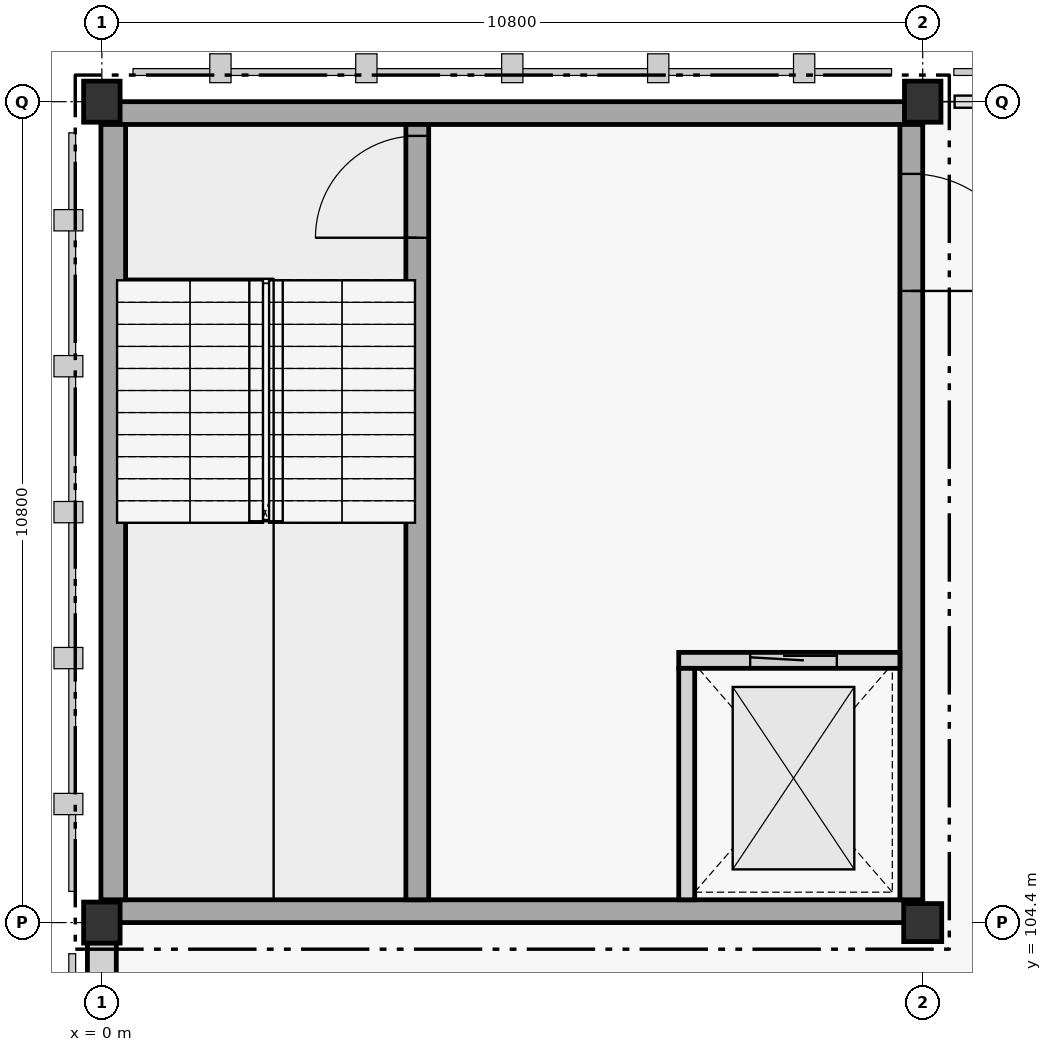
"""IFC4 building model, lengths in metres.
Left out: names, types, materials, properties, quantities, classifications, styles, units other than length and angle.
Written with IfcOpenShell. Run it as: python <this file> out.ifc"""

import sys

from ifc_helpers import new_model, si_unit, direction, frame, frame_2d, origin, origin_2d, place, context, subcontext, project, spatial, rectangle, extrude, element, fill, save


model = new_model("IFC4")
c1 = context("Model", 3, precision=1e-05, world=origin(), true_north=direction((0.0, 1.0)))
c2 = subcontext(c1, "Body", "Model", "MODEL_VIEW")
j1 = project(units=[si_unit("LENGTHUNIT", "METRE"), si_unit("PLANEANGLEUNIT", "RADIAN")], contexts=[c1])
p1 = place(None, origin())
s1 = spatial("IfcSite", under=j1, at=p1, CompositionType="ELEMENT")
p2 = place(p1, origin())
s2 = spatial("IfcBuilding", under=s1, at=p2, CompositionType="ELEMENT")
p3 = place(p2, frame((0.0, 0.0, 15.0)))
s3 = spatial("IfcBuildingStorey", under=s2, at=p3, CompositionType="ELEMENT", Elevation=15.0)
for number, where, z_axis, x_axis in (
    (1, (0.0, 104.4, 0.0), (0.0, 0.0, 1.0), (1.0, 0.0, 0.0)),
    (2, (0.0, 115.2, 0.0), (0.0, 0.0, 1.0), (1.0, 0.0, 0.0)),
):
    element("IfcColumn", number, at=place(p3, frame(where, z_axis=z_axis, x_axis=x_axis)), inside=s3, PredefinedType="COLUMN", context=c2, shape_type="SweptSolid", body=[
        extrude(rectangle(XDim=0.48, YDim=0.54, at=origin_2d()), origin(), (0.0, 0.0, 1.0), 4.2),
    ])
p4 = place(p3, frame((10.8, 104.4, 0.0), z_axis=(0.0, 0.0, 1.0), x_axis=(1.0, 0.0, 0.0)))
e3 = element("IfcColumn", 3, at=p4, inside=s3, PredefinedType="COLUMN", context=c2, shape_type="SweptSolid", body=[
    extrude(rectangle(XDim=0.5, YDim=0.5, at=origin_2d()), origin(), (0.0, 0.0, 1.0), 4.2),
])
p5 = place(p3, frame((10.8, 115.2, 0.0), z_axis=(0.0, 0.0, 1.0), x_axis=(1.0, 0.0, 0.0)))
e4 = element("IfcColumn", 4, at=p5, inside=s3, PredefinedType="COLUMN", context=c2, shape_type="SweptSolid", body=[
    extrude(rectangle(XDim=0.48, YDim=0.54, at=origin_2d()), origin(), (0.0, 0.0, 1.0), 4.2),
])
for number, where, z_axis, x_axis in (
    (5, (10.8, 104.55, 0.0), (0.0, 0.0, 1.0), (-1.0, 0.0, 0.0)),
    (6, (0.0, 115.05, 0.0), (0.0, 0.0, 1.0), (1.0, 0.0, 0.0)),
):
    element("IfcWall", number, at=place(p3, frame(where, z_axis=z_axis, x_axis=x_axis)), inside=s3, PredefinedType="SHEAR", context=c2, shape_type="SweptSolid", body=[
        extrude(rectangle(XDim=10.8, YDim=0.3, at=frame_2d((5.4, 0.0))), origin(), (0.0, 0.0, 1.0), 4.2),
    ])
p6 = place(p3, frame((0.15, 104.7, 0.0), z_axis=(0.0, 0.0, 1.0), x_axis=(0.0, 1.0, 0.0)))
e7 = element("IfcWall", 7, at=p6, inside=s3, PredefinedType="SHEAR", context=c2, shape_type="SweptSolid", body=[
    extrude(rectangle(XDim=10.2, YDim=0.325, at=frame_2d((5.1, 0.0))), origin(), (0.0, 0.0, 1.0), 4.2),
])
p7 = place(p3, frame((10.65, 114.9, 0.0), z_axis=(0.0, 0.0, 1.0), x_axis=(0.0, -1.0, 0.0)))
e8 = element("IfcWall", 8, at=p7, inside=s3, PredefinedType="SHEAR", context=c2, shape_type="SweptSolid", body=[
    extrude(rectangle(XDim=10.2, YDim=0.3, at=frame_2d((5.1, 0.0))), origin(), (0.0, 0.0, 1.0), 4.2),
])
p8 = place(p7, frame((0.65, 0.0, 0.0)))
e9 = element("IfcOpeningElement", 9, at=p8, cuts=e8, PredefinedType="OPENING", context=c2, shape_type="SweptSolid", body=[
    extrude(rectangle(XDim=1.54, YDim=2.22, at=frame_2d((0.77, 1.11))), frame((0.0, 0.15, 0.0), z_axis=(0.0, -1.0, 0.0), x_axis=(1.0, 0.0, 0.0)), (0.0, 0.0, 1.0), 0.3),
])
p9 = place(p3, frame((4.15, 104.7, 0.0), z_axis=(0.0, 0.0, 1.0), x_axis=(0.0, 1.0, 0.0)))
e10 = element("IfcWall", 10, at=p9, inside=s3, PredefinedType="SHEAR", context=c2, shape_type="SweptSolid", body=[
    extrude(rectangle(XDim=10.2, YDim=0.3, at=frame_2d((5.1, 0.0))), origin(), (0.0, 0.0, 1.0), 4.2),
])
p10 = place(p9, frame((8.71, 0.0, 0.0)))
e11 = element("IfcOpeningElement", 11, at=p10, cuts=e10, PredefinedType="OPENING", context=c2, shape_type="SweptSolid", body=[
    extrude(rectangle(XDim=1.34, YDim=2.18, at=frame_2d((0.67, 1.09))), frame((0.0, 0.15, 0.0), z_axis=(0.0, -1.0, 0.0), x_axis=(1.0, 0.0, 0.0)), (0.0, 0.0, 1.0), 0.3),
])
p11 = place(p3, frame((0.0, 97.466, 0.0), z_axis=(0.0, 0.0, 1.0), x_axis=(0.0, 1.0, 0.0)))
e12 = element("IfcWall", 12, at=p11, inside=s3, PredefinedType="STANDARD", context=c2, shape_type="SweptSolid", body=[
    extrude(rectangle(XDim=6.668, YDim=0.38, at=frame_2d((3.334, 0.0))), origin(), (0.0, 0.0, 1.0), 3.285),
])
p12 = place(p3, frame((7.59, 107.85, 0.0), z_axis=(0.0, 0.0, 1.0), x_axis=(1.0, 0.0, 0.0)))
e13 = element("IfcWall", 13, at=p12, inside=s3, PredefinedType="STANDARD", context=c2, shape_type="SweptSolid", body=[
    extrude(rectangle(XDim=2.91, YDim=0.21, at=frame_2d((1.455, 0.0))), origin(), (0.0, 0.0, 1.0), 4.2),
])
p13 = place(p12, frame((0.94, 0.0, 0.0)))
e14 = element("IfcOpeningElement", 14, at=p13, cuts=e13, PredefinedType="OPENING", context=c2, shape_type="SweptSolid", body=[
    extrude(rectangle(XDim=1.14, YDim=2.16, at=frame_2d((0.57, 1.08))), frame((0.0, 0.105, 0.0), z_axis=(0.0, -1.0, 0.0), x_axis=(1.0, 0.0, 0.0)), (0.0, 0.0, 1.0), 0.21),
])
p14 = place(p3, frame((7.695, 104.7, 0.0), z_axis=(0.0, 0.0, 1.0), x_axis=(0.0, 1.0, 0.0)))
e15 = element("IfcWall", 15, at=p14, inside=s3, PredefinedType="STANDARD", context=c2, shape_type="SweptSolid", body=[
    extrude(rectangle(XDim=3.045, YDim=0.21, at=frame_2d((1.522, 0.0))), origin(), (0.0, 0.0, 1.0), 4.2),
])
p15 = place(p13, origin())
e16 = element("IfcDoor", 16, at=p15, inside=s3, OperationType="SLIDING_TO_LEFT", PredefinedType="DOOR", context=c2, shape_type="SweptSolid", body=[
    extrude(rectangle(XDim=1.14, YDim=2.16, at=frame_2d((0.57, 1.08))), frame((0.0, 0.025, 0.0), z_axis=(0.0, -1.0, 0.0), x_axis=(1.0, 0.0, 0.0)), (0.0, 0.0, 1.0), 0.05),
])
fill(e14, e16)
p16 = place(p10, origin())
e17 = element("IfcDoor", 17, at=p16, inside=s3, OperationType="SINGLE_SWING_LEFT", PredefinedType="DOOR", context=c2, shape_type="SweptSolid", body=[
    extrude(rectangle(XDim=1.34, YDim=2.18, at=frame_2d((0.67, 1.09))), frame((0.0, 0.025, 0.0), z_axis=(0.0, -1.0, 0.0), x_axis=(1.0, 0.0, 0.0)), (0.0, 0.0, 1.0), 0.05),
])
fill(e11, e17)
p17 = place(p8, origin())
e18 = element("IfcDoor", 18, at=p17, inside=s3, OperationType="SINGLE_SWING_RIGHT", PredefinedType="DOOR", context=c2, shape_type="SweptSolid", body=[
    extrude(rectangle(XDim=1.54, YDim=2.22, at=frame_2d((0.77, 1.11))), frame((0.0, 0.025, 0.0), z_axis=(0.0, -1.0, 0.0), x_axis=(1.0, 0.0, 0.0)), (0.0, 0.0, 1.0), 0.05),
])
fill(e9, e18)
save(model, sys.argv[1])
